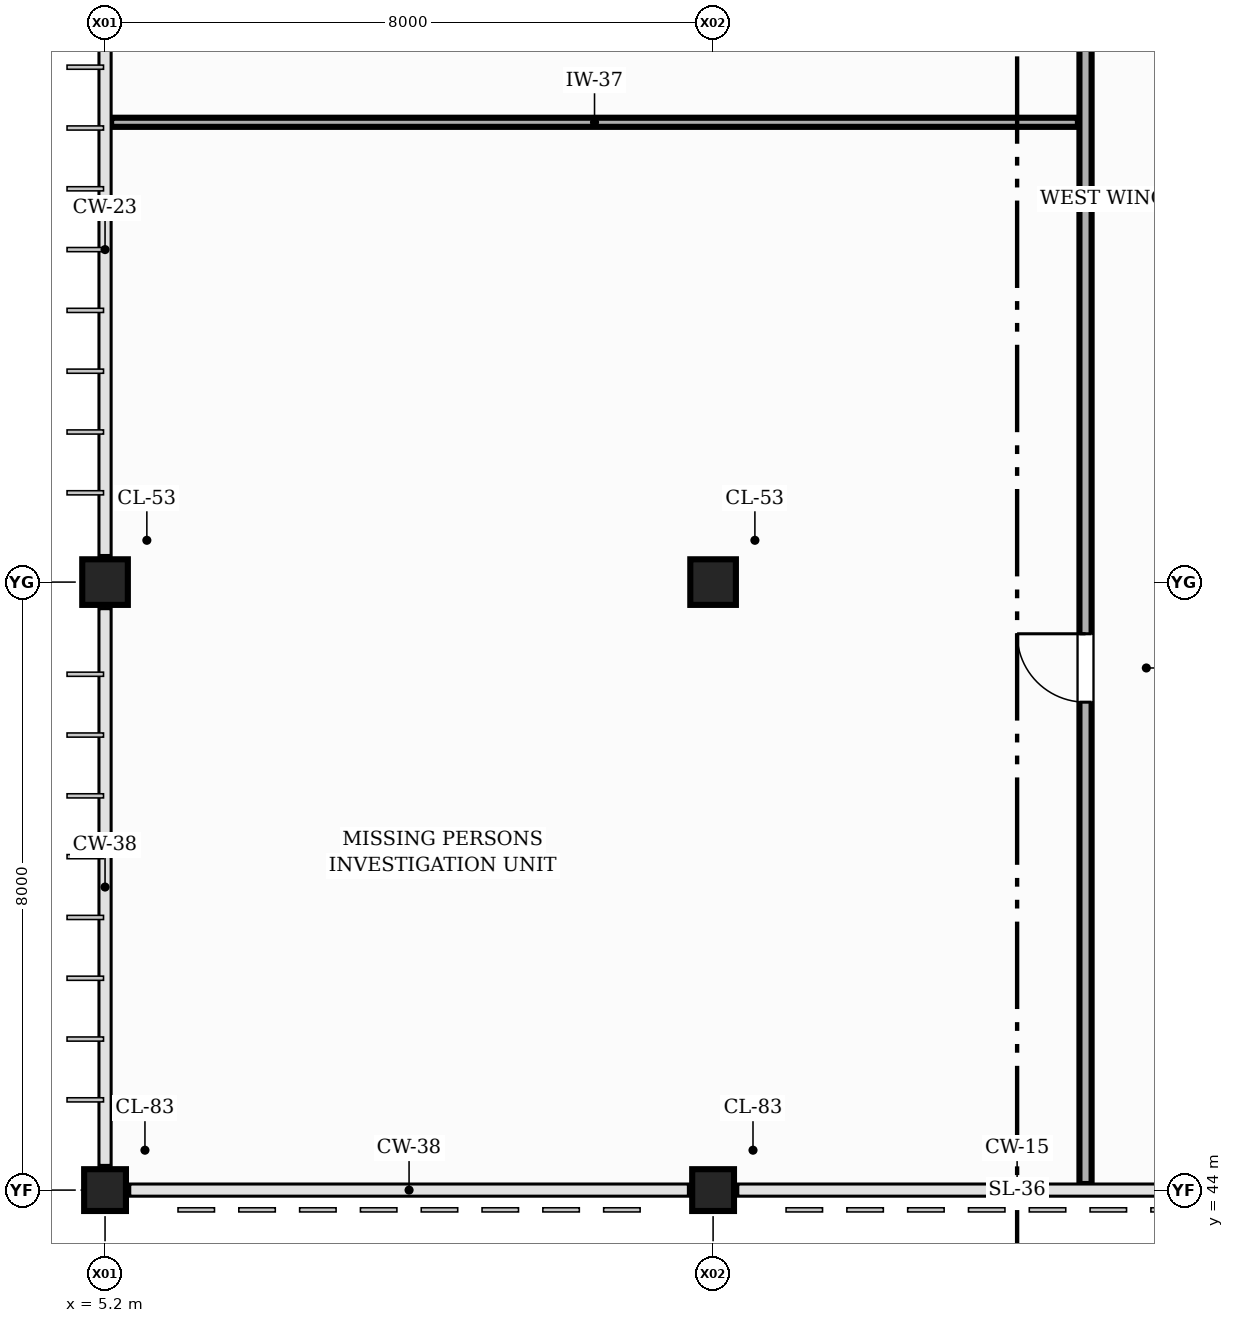
"""IFC4 building model, lengths in metres.
Left out: names, types, materials, properties, quantities, classifications, styles, units other than length and angle.
Written with IfcOpenShell. Run it as: python <this file> out.ifc"""

import sys

from ifc_helpers import new_model, si_unit, direction, frame, frame_2d, origin, origin_2d, place, context, subcontext, project, spatial, rectangle, extrude, element, fill, save


model = new_model("IFC4")
c1 = context("Model", 3, precision=1e-05, world=origin(), true_north=direction((0.0, 1.0)))
c2 = subcontext(c1, "Body", "Model", "MODEL_VIEW")
j1 = project(units=[si_unit("LENGTHUNIT", "METRE"), si_unit("PLANEANGLEUNIT", "RADIAN")], contexts=[c1])
p1 = place(None, origin())
s1 = spatial("IfcSite", under=j1, at=p1, CompositionType="ELEMENT")
p2 = place(p1, origin())
s2 = spatial("IfcBuilding", under=s1, at=p2, CompositionType="ELEMENT")
p3 = place(p2, frame((0.0, 0.0, 4.8)))
s3 = spatial("IfcBuildingStorey", under=s2, at=p3, CompositionType="ELEMENT", Elevation=4.8)
p4 = place(p3, frame((5.2, 44.0, 0.0), z_axis=(0.0, 0.0, 1.0), x_axis=(1.0, 0.0, 0.0)))
e1 = element("IfcColumn", 1, at=p4, inside=s3, PredefinedType="COLUMN", context=c2, shape_type="SweptSolid", body=[
    extrude(rectangle(XDim=0.55, YDim=0.55, at=origin_2d()), origin(), (0.0, 0.0, 1.0), 4.2),
])
p5 = place(p3, frame((5.2, 52.0, 0.0), z_axis=(0.0, 0.0, 1.0), x_axis=(1.0, 0.0, 0.0)))
e2 = element("IfcColumn", 2, at=p5, inside=s3, PredefinedType="COLUMN", context=c2, shape_type="SweptSolid", body=[
    extrude(rectangle(XDim=0.6, YDim=0.6, at=origin_2d()), origin(), (0.0, 0.0, 1.0), 4.2),
])
p6 = place(p3, frame((13.2, 44.0, 0.0), z_axis=(0.0, 0.0, 1.0), x_axis=(1.0, 0.0, 0.0)))
e3 = element("IfcColumn", 3, at=p6, inside=s3, PredefinedType="COLUMN", context=c2, shape_type="SweptSolid", body=[
    extrude(rectangle(XDim=0.55, YDim=0.55, at=origin_2d()), origin(), (0.0, 0.0, 1.0), 4.2),
])
p7 = place(p3, frame((13.2, 52.0, 0.0), z_axis=(0.0, 0.0, 1.0), x_axis=(1.0, 0.0, 0.0)))
e4 = element("IfcColumn", 4, at=p7, inside=s3, PredefinedType="COLUMN", context=c2, shape_type="SweptSolid", body=[
    extrude(rectangle(XDim=0.6, YDim=0.6, at=origin_2d()), origin(), (0.0, 0.0, 1.0), 4.2),
])
p8 = place(p3, frame((5.28, 58.05, 0.0), z_axis=(0.0, 0.0, 1.0), x_axis=(1.0, 0.0, 0.0)))
e5 = element("IfcWall", 5, at=p8, inside=s3, PredefinedType="PARTITIONING", context=c2, shape_type="SweptSolid", body=[
    extrude(rectangle(XDim=12.72, YDim=0.12, at=frame_2d((6.36, 0.0))), origin(), (0.0, 0.0, 1.0), 3.295),
])
p9 = place(p3, frame((18.1, 44.08, 0.0), z_axis=(0.0, 0.0, 1.0), x_axis=(0.0, 1.0, 0.0)))
e6 = element("IfcWall", 6, at=p9, inside=s3, PredefinedType="PARTITIONING", context=c2, shape_type="SweptSolid", body=[
    extrude(rectangle(XDim=37.82, YDim=0.16, at=frame_2d((18.91, 0.0))), origin(), (0.0, 0.0, 1.0), 3.145),
])
p10 = place(p9, frame((6.34, 0.0, 0.0)))
e7 = element("IfcOpeningElement", 7, at=p10, cuts=e6, PredefinedType="OPENING", context=c2, shape_type="SweptSolid", body=[
    extrude(rectangle(XDim=0.9, YDim=2.1, at=frame_2d((0.45, 1.05))), frame((0.0, 0.09, 0.0), z_axis=(0.0, -1.0, 0.0), x_axis=(1.0, 0.0, 0.0)), (0.0, 0.0, 1.0), 0.18),
])
p11 = place(p9, frame((19.5, 0.0, 0.0)))
e8 = element("IfcOpeningElement", 8, at=p11, cuts=e6, PredefinedType="OPENING", context=c2, shape_type="SweptSolid", body=[
    extrude(rectangle(XDim=0.92, YDim=2.1, at=frame_2d((0.46, 1.05))), frame((0.0, 0.09, 0.0), z_axis=(0.0, -1.0, 0.0), x_axis=(1.0, 0.0, 0.0)), (0.0, 0.0, 1.0), 0.18),
])
p12 = place(p9, frame((31.42, 0.0, 0.0)))
e9 = element("IfcOpeningElement", 9, at=p12, cuts=e6, PredefinedType="OPENING", context=c2, shape_type="SweptSolid", body=[
    extrude(rectangle(XDim=0.95, YDim=2.1, at=frame_2d((0.475, 1.05))), frame((0.0, 0.09, 0.0), z_axis=(0.0, -1.0, 0.0), x_axis=(1.0, 0.0, 0.0)), (0.0, 0.0, 1.0), 0.18),
])
p13 = place(p10, origin())
e10 = element("IfcDoor", 10, at=p13, inside=s3, OperationType="SINGLE_SWING_RIGHT", PredefinedType="DOOR", context=c2, shape_type="SweptSolid", body=[
    extrude(rectangle(XDim=0.9, YDim=2.1, at=frame_2d((0.45, 1.05))), frame((0.0, 0.025, 0.0), z_axis=(0.0, -1.0, 0.0), x_axis=(1.0, 0.0, 0.0)), (0.0, 0.0, 1.0), 0.05),
])
fill(e7, e10)
save(model, sys.argv[1])
